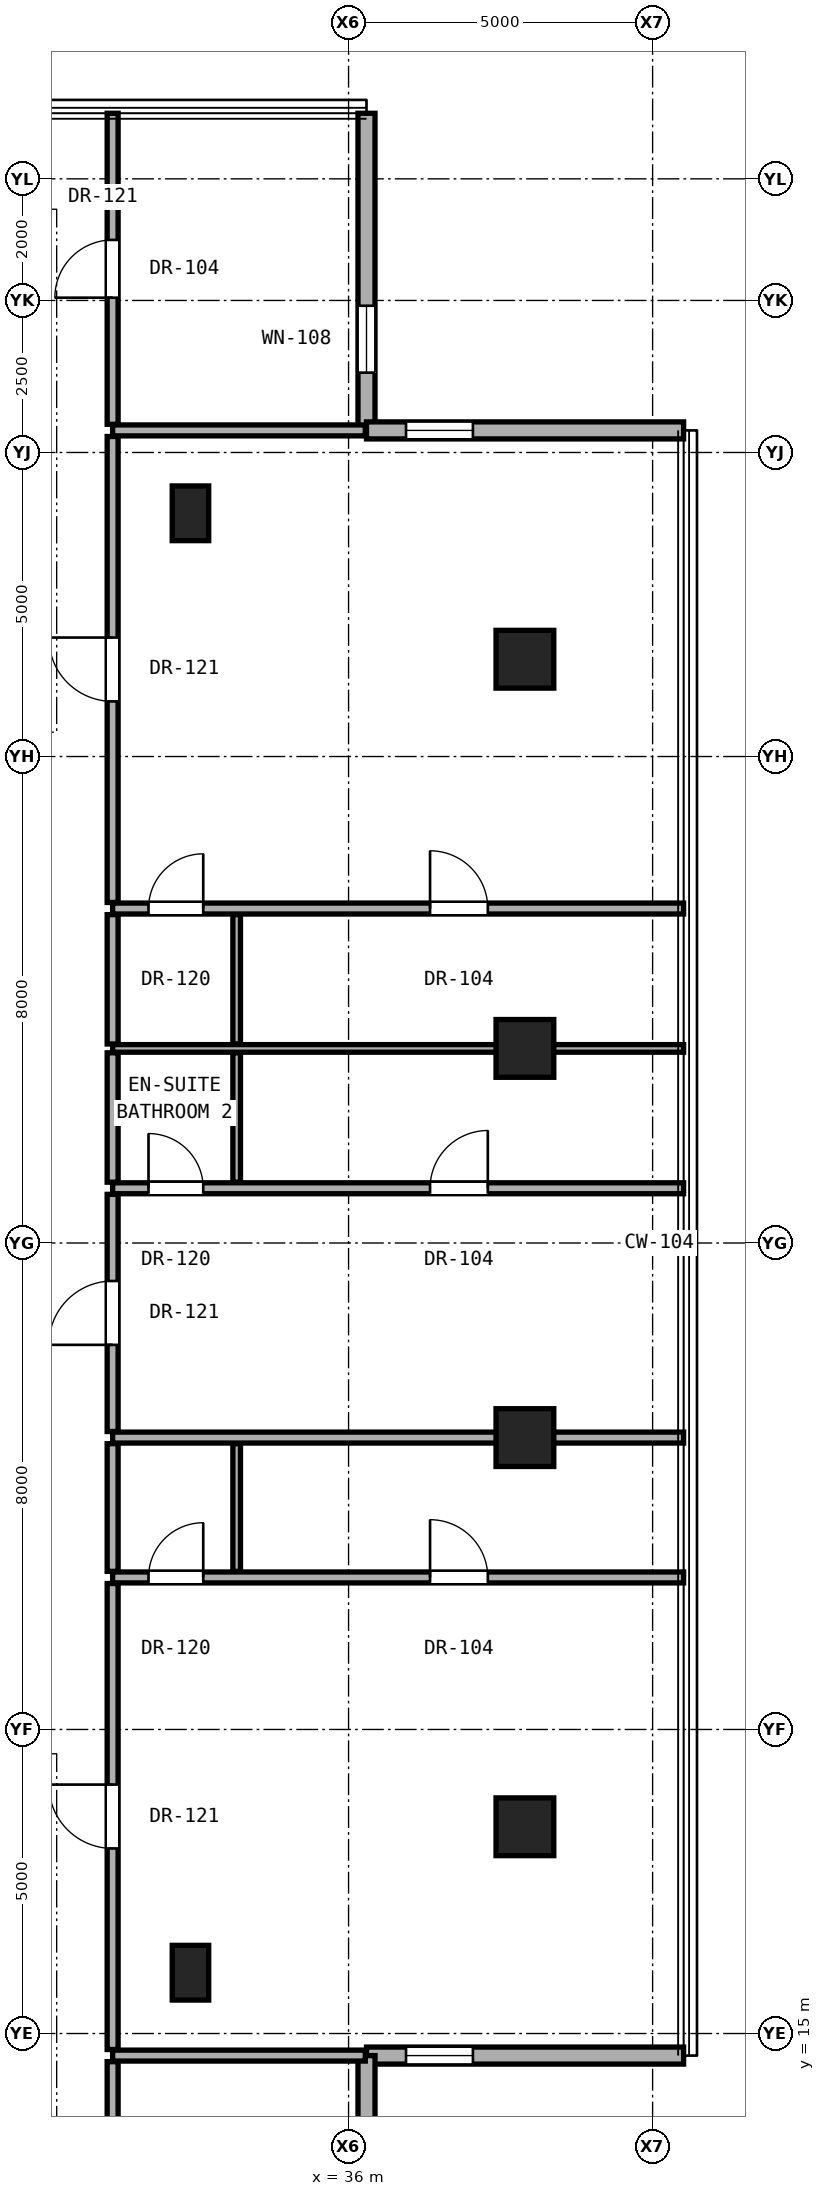
"""IFC4 building model, lengths in metres.
Left out: names, types, materials, properties, quantities, classifications, styles, units other than length and angle.
Written with IfcOpenShell. Run it as: python <this file> out.ifc"""

import sys

from ifc_helpers import new_model, si_unit, direction, frame, frame_2d, origin, origin_2d, place, context, subcontext, project, spatial, rectangle, hollow_rectangle, extrude, element, fill, save


model = new_model("IFC4")
c1 = context("Model", 3, precision=1e-05, world=origin(), true_north=direction((0.0, 1.0)))
c2 = subcontext(c1, "Body", "Model", "MODEL_VIEW")
j1 = project(units=[si_unit("LENGTHUNIT", "METRE"), si_unit("PLANEANGLEUNIT", "RADIAN")], contexts=[c1])
p1 = place(None, origin())
s1 = spatial("IfcSite", under=j1, at=p1, CompositionType="ELEMENT")
p2 = place(p1, origin())
s2 = spatial("IfcBuilding", under=s1, at=p2, CompositionType="ELEMENT")
p3 = place(p2, frame((0.0, 0.0, 203.15)))
s3 = spatial("IfcBuildingStorey", under=s2, at=p3, CompositionType="ELEMENT", Elevation=203.15)
for number, where, z_axis, x_axis in (
    (1, (38.9, 18.4, 0.0), (0.0, 0.0, 1.0), (1.0, 0.0, 0.0)),
    (2, (38.9, 24.8, 0.0), (0.0, 0.0, 1.0), (1.0, 0.0, 0.0)),
    (3, (38.9, 31.2, 0.0), (0.0, 0.0, 1.0), (1.0, 0.0, 0.0)),
    (4, (38.9, 37.6, 0.0), (0.0, 0.0, 1.0), (1.0, 0.0, 0.0)),
):
    element("IfcColumn", number, at=place(p3, frame(where, z_axis=z_axis, x_axis=x_axis)), inside=s3, PredefinedType="COLUMN", context=c2, shape_type="SweptSolid", body=[
        extrude(hollow_rectangle(XDim=0.95, YDim=0.95, WallThickness=0.05, at=origin_2d()), origin(), (0.0, 0.0, 1.0), 3.25),
    ])
for number, where, z_axis, x_axis in (
    (5, (33.4, 16.0, 0.0), (0.0, 0.0, 1.0), (1.0, 0.0, 0.0)),
    (6, (33.4, 40.0, 0.0), (0.0, 0.0, 1.0), (1.0, 0.0, 0.0)),
):
    element("IfcColumn", number, at=place(p3, frame(where, z_axis=z_axis, x_axis=x_axis)), inside=s3, PredefinedType="PILASTER", context=c2, shape_type="SweptSolid", body=[
        extrude(rectangle(XDim=0.6, YDim=0.9, at=origin_2d()), origin(), (0.0, 0.0, 1.0), 3.25),
    ])
p4 = place(p3, frame((36.295, 41.363, 0.0), z_axis=(0.0, 0.0, 1.0), x_axis=(0.0, 1.0, 0.0)))
e7 = element("IfcWall", 7, at=p4, inside=s3, PredefinedType="SOLIDWALL", context=c2, shape_type="SweptSolid", body=[
    extrude(rectangle(XDim=5.215, YDim=0.28, at=frame_2d((2.607, 0.0))), origin(), (0.0, 0.0, 1.0), 3.03),
])
p5 = place(p4, frame((0.95, 0.0, 0.85)))
e8 = element("IfcOpeningElement", 8, at=p5, cuts=e7, PredefinedType="OPENING", context=c2, shape_type="SweptSolid", body=[
    extrude(rectangle(XDim=1.1, YDim=2.0, at=frame_2d((0.55, 1.0))), frame((0.0, 0.15, 0.0), z_axis=(0.0, -1.0, 0.0), x_axis=(1.0, 0.0, 0.0)), (0.0, 0.0, 1.0), 0.3),
])
p6 = place(p3, frame((36.295, 14.637, 0.0), z_axis=(0.0, 0.0, 1.0), x_axis=(1.0, 0.0, 0.0)))
e9 = element("IfcWall", 9, at=p6, inside=s3, PredefinedType="SOLIDWALL", context=c2, shape_type="SweptSolid", body=[
    extrude(rectangle(XDim=5.215, YDim=0.28, at=frame_2d((2.607, 0.0))), origin(), (0.0, 0.0, 1.0), 3.03),
])
p7 = place(p6, frame((0.65, 0.0, 0.85)))
e10 = element("IfcOpeningElement", 10, at=p7, cuts=e9, PredefinedType="OPENING", context=c2, shape_type="SweptSolid", body=[
    extrude(rectangle(XDim=1.1, YDim=2.0, at=frame_2d((0.55, 1.0))), frame((0.0, 0.15, 0.0), z_axis=(0.0, -1.0, 0.0), x_axis=(1.0, 0.0, 0.0)), (0.0, 0.0, 1.0), 0.3),
])
p8 = place(p3, frame((36.295, 9.422, 0.0), z_axis=(0.0, 0.0, 1.0), x_axis=(0.0, 1.0, 0.0)))
e11 = element("IfcWall", 11, at=p8, inside=s3, PredefinedType="SOLIDWALL", context=c2, shape_type="SweptSolid", body=[
    extrude(rectangle(XDim=5.215, YDim=0.28, at=frame_2d((2.607, 0.0))), origin(), (0.0, 0.0, 1.0), 3.03),
])
p9 = place(p3, frame((41.51, 41.363, 0.0), z_axis=(0.0, 0.0, 1.0), x_axis=(-1.0, 0.0, 0.0)))
e12 = element("IfcWall", 12, at=p9, inside=s3, PredefinedType="SOLIDWALL", context=c2, shape_type="SweptSolid", body=[
    extrude(rectangle(XDim=5.215, YDim=0.28, at=frame_2d((2.607, 0.0))), origin(), (0.0, 0.0, 1.0), 3.03),
])
p10 = place(p9, frame((3.465, 0.0, 0.85)))
e13 = element("IfcOpeningElement", 13, at=p10, cuts=e12, PredefinedType="OPENING", context=c2, shape_type="SweptSolid", body=[
    extrude(rectangle(XDim=1.1, YDim=2.0, at=frame_2d((0.55, 1.0))), frame((0.0, 0.15, 0.0), z_axis=(0.0, -1.0, 0.0), x_axis=(1.0, 0.0, 0.0)), (0.0, 0.0, 1.0), 0.3),
])
p11 = place(p3, frame((32.12, 14.637, 0.0), z_axis=(0.0, 0.0, 1.0), x_axis=(1.0, 0.0, 0.0)))
e14 = element("IfcWall", 14, at=p11, inside=s3, PredefinedType="PARTITIONING", context=c2, shape_type="SweptSolid", body=[
    extrude(rectangle(XDim=4.155, YDim=0.18, at=frame_2d((2.077, 0.0))), origin(), (0.0, 0.0, 1.0), 3.05),
])
p12 = place(p3, frame((32.12, 22.5, 0.0), z_axis=(0.0, 0.0, 1.0), x_axis=(1.0, 0.0, 0.0)))
e15 = element("IfcWall", 15, at=p12, inside=s3, PredefinedType="PARTITIONING", context=c2, shape_type="SweptSolid", body=[
    extrude(rectangle(XDim=9.39, YDim=0.18, at=frame_2d((4.695, 0.0))), origin(), (0.0, 0.0, 1.0), 2.269),
])
p13 = place(p12, frame((5.22, 0.0, 0.0)))
e16 = element("IfcOpeningElement", 16, at=p13, cuts=e15, PredefinedType="OPENING", context=c2, shape_type="SweptSolid", body=[
    extrude(rectangle(XDim=0.95, YDim=2.15, at=frame_2d((0.475, 1.075))), frame((0.0, 0.1, 0.0), z_axis=(0.0, -1.0, 0.0), x_axis=(1.0, 0.0, 0.0)), (0.0, 0.0, 1.0), 0.2),
])
p14 = place(p12, frame((0.59, 0.0, 0.0)))
e17 = element("IfcOpeningElement", 17, at=p14, cuts=e15, PredefinedType="OPENING", context=c2, shape_type="SweptSolid", body=[
    extrude(rectangle(XDim=0.9, YDim=2.1, at=frame_2d((0.45, 1.05))), frame((0.0, 0.1, 0.0), z_axis=(0.0, -1.0, 0.0), x_axis=(1.0, 0.0, 0.0)), (0.0, 0.0, 1.0), 0.2),
])
p15 = place(p3, frame((32.12, 24.8, 0.0), z_axis=(0.0, 0.0, 1.0), x_axis=(1.0, 0.0, 0.0)))
e18 = element("IfcWall", 18, at=p15, inside=s3, PredefinedType="PARTITIONING", context=c2, shape_type="SweptSolid", body=[
    extrude(rectangle(XDim=9.39, YDim=0.18, at=frame_2d((4.695, 0.0))), origin(), (0.0, 0.0, 1.0), 2.269),
])
p16 = place(p3, frame((32.12, 28.9, 0.0), z_axis=(0.0, 0.0, 1.0), x_axis=(1.0, 0.0, 0.0)))
e19 = element("IfcWall", 19, at=p16, inside=s3, PredefinedType="PARTITIONING", context=c2, shape_type="SweptSolid", body=[
    extrude(rectangle(XDim=9.39, YDim=0.18, at=frame_2d((4.695, 0.0))), origin(), (0.0, 0.0, 1.0), 2.269),
])
p17 = place(p16, frame((5.22, 0.0, 0.0)))
e20 = element("IfcOpeningElement", 20, at=p17, cuts=e19, PredefinedType="OPENING", context=c2, shape_type="SweptSolid", body=[
    extrude(rectangle(XDim=0.95, YDim=2.15, at=frame_2d((0.475, 1.075))), frame((0.0, 0.1, 0.0), z_axis=(0.0, -1.0, 0.0), x_axis=(1.0, 0.0, 0.0)), (0.0, 0.0, 1.0), 0.2),
])
p18 = place(p16, frame((0.59, 0.0, 0.0)))
e21 = element("IfcOpeningElement", 21, at=p18, cuts=e19, PredefinedType="OPENING", context=c2, shape_type="SweptSolid", body=[
    extrude(rectangle(XDim=0.9, YDim=2.1, at=frame_2d((0.45, 1.05))), frame((0.0, 0.1, 0.0), z_axis=(0.0, -1.0, 0.0), x_axis=(1.0, 0.0, 0.0)), (0.0, 0.0, 1.0), 0.2),
])
p19 = place(p3, frame((32.12, 31.2, 0.0), z_axis=(0.0, 0.0, 1.0), x_axis=(1.0, 0.0, 0.0)))
e22 = element("IfcWall", 22, at=p19, inside=s3, PredefinedType="PARTITIONING", context=c2, shape_type="SweptSolid", body=[
    extrude(rectangle(XDim=9.39, YDim=0.125, at=frame_2d((4.695, 0.0))), origin(), (0.0, 0.0, 1.0), 2.269),
])
p20 = place(p3, frame((32.12, 33.5, 0.0), z_axis=(0.0, 0.0, 1.0), x_axis=(1.0, 0.0, 0.0)))
e23 = element("IfcWall", 23, at=p20, inside=s3, PredefinedType="PARTITIONING", context=c2, shape_type="SweptSolid", body=[
    extrude(rectangle(XDim=9.39, YDim=0.18, at=frame_2d((4.695, 0.0))), origin(), (0.0, 0.0, 1.0), 2.269),
])
p21 = place(p20, frame((5.22, 0.0, 0.0)))
e24 = element("IfcOpeningElement", 24, at=p21, cuts=e23, PredefinedType="OPENING", context=c2, shape_type="SweptSolid", body=[
    extrude(rectangle(XDim=0.95, YDim=2.15, at=frame_2d((0.475, 1.075))), frame((0.0, 0.1, 0.0), z_axis=(0.0, -1.0, 0.0), x_axis=(1.0, 0.0, 0.0)), (0.0, 0.0, 1.0), 0.2),
])
p22 = place(p20, frame((0.59, 0.0, 0.0)))
e25 = element("IfcOpeningElement", 25, at=p22, cuts=e23, PredefinedType="OPENING", context=c2, shape_type="SweptSolid", body=[
    extrude(rectangle(XDim=0.9, YDim=2.1, at=frame_2d((0.45, 1.05))), frame((0.0, 0.1, 0.0), z_axis=(0.0, -1.0, 0.0), x_axis=(1.0, 0.0, 0.0)), (0.0, 0.0, 1.0), 0.2),
])
p23 = place(p3, frame((32.12, 41.363, 0.0), z_axis=(0.0, 0.0, 1.0), x_axis=(1.0, 0.0, 0.0)))
e26 = element("IfcWall", 26, at=p23, inside=s3, PredefinedType="PARTITIONING", context=c2, shape_type="SweptSolid", body=[
    extrude(rectangle(XDim=4.155, YDim=0.18, at=frame_2d((2.077, 0.0))), origin(), (0.0, 0.0, 1.0), 3.05),
])
p24 = place(p3, frame((32.12, 9.422, 0.0), z_axis=(0.0, 0.0, 1.0), x_axis=(0.0, 1.0, 0.0)))
e27 = element("IfcWall", 27, at=p24, inside=s3, PredefinedType="PARTITIONING", context=c2, shape_type="SweptSolid", body=[
    extrude(rectangle(XDim=5.115, YDim=0.18, at=frame_2d((2.558, 0.0))), origin(), (0.0, 0.0, 1.0), 3.05),
])
p25 = place(p24, frame((2.083, 0.0, 0.0)))
e28 = element("IfcOpeningElement", 28, at=p25, cuts=e27, PredefinedType="OPENING", context=c2, shape_type="SweptSolid", body=[
    extrude(rectangle(XDim=0.95, YDim=2.15, at=frame_2d((0.475, 1.075))), frame((0.0, 0.1, 0.0), z_axis=(0.0, -1.0, 0.0), x_axis=(1.0, 0.0, 0.0)), (0.0, 0.0, 1.0), 0.2),
])
p26 = place(p3, frame((32.12, 14.737, 0.0), z_axis=(0.0, 0.0, 1.0), x_axis=(0.0, 1.0, 0.0)))
e29 = element("IfcWall", 29, at=p26, inside=s3, PredefinedType="PARTITIONING", context=c2, shape_type="SweptSolid", body=[
    extrude(rectangle(XDim=7.663, YDim=0.18, at=frame_2d((3.832, 0.0))), origin(), (0.0, 0.0, 1.0), 2.442),
])
p27 = place(p26, frame((3.306, 0.0, 0.0)))
e30 = element("IfcOpeningElement", 30, at=p27, cuts=e29, PredefinedType="OPENING", context=c2, shape_type="SweptSolid", body=[
    extrude(rectangle(XDim=1.05, YDim=2.2, at=frame_2d((0.525, 1.1))), frame((0.0, 0.1, 0.0), z_axis=(0.0, -1.0, 0.0), x_axis=(1.0, 0.0, 0.0)), (0.0, 0.0, 1.0), 0.2),
])
p28 = place(p3, frame((32.12, 22.6, 0.0), z_axis=(0.0, 0.0, 1.0), x_axis=(0.0, 1.0, 0.0)))
e31 = element("IfcWall", 31, at=p28, inside=s3, PredefinedType="PARTITIONING", context=c2, shape_type="SweptSolid", body=[
    extrude(rectangle(XDim=2.1, YDim=0.18, at=frame_2d((1.05, 0.0))), origin(), (0.0, 0.0, 1.0), 2.346),
])
p29 = place(p3, frame((32.12, 24.9, 0.0), z_axis=(0.0, 0.0, 1.0), x_axis=(0.0, 1.0, 0.0)))
e32 = element("IfcWall", 32, at=p29, inside=s3, PredefinedType="PARTITIONING", context=c2, shape_type="SweptSolid", body=[
    extrude(rectangle(XDim=3.9, YDim=0.18, at=frame_2d((1.95, 0.0))), origin(), (0.0, 0.0, 1.0), 2.346),
])
p30 = place(p29, frame((1.425, 0.0, 0.0)))
e33 = element("IfcOpeningElement", 33, at=p30, cuts=e32, PredefinedType="OPENING", context=c2, shape_type="SweptSolid", body=[
    extrude(rectangle(XDim=1.05, YDim=2.2, at=frame_2d((0.525, 1.1))), frame((0.0, 0.1, 0.0), z_axis=(0.0, -1.0, 0.0), x_axis=(1.0, 0.0, 0.0)), (0.0, 0.0, 1.0), 0.2),
])
for number, where, z_axis, x_axis in (
    (34, (32.12, 29.0, 0.0), (0.0, 0.0, 1.0), (0.0, 1.0, 0.0)),
    (35, (32.12, 31.272, 0.0), (0.0, 0.0, 1.0), (0.0, 1.0, 0.0)),
):
    element("IfcWall", number, at=place(p3, frame(where, z_axis=z_axis, x_axis=x_axis)), inside=s3, PredefinedType="PARTITIONING", context=c2, shape_type="SweptSolid", body=[
        extrude(rectangle(XDim=2.127, YDim=0.18, at=frame_2d((1.064, 0.0))), origin(), (0.0, 0.0, 1.0), 2.346),
    ])
p31 = place(p3, frame((32.12, 33.6, 0.0), z_axis=(0.0, 0.0, 1.0), x_axis=(0.0, 1.0, 0.0)))
e36 = element("IfcWall", 36, at=p31, inside=s3, PredefinedType="PARTITIONING", context=c2, shape_type="SweptSolid", body=[
    extrude(rectangle(XDim=7.663, YDim=0.18, at=frame_2d((3.832, 0.0))), origin(), (0.0, 0.0, 1.0), 2.442),
])
p32 = place(p31, frame((3.306, 0.0, 0.0)))
e37 = element("IfcOpeningElement", 37, at=p32, cuts=e36, PredefinedType="OPENING", context=c2, shape_type="SweptSolid", body=[
    extrude(rectangle(XDim=1.05, YDim=2.2, at=frame_2d((0.525, 1.1))), frame((0.0, 0.1, 0.0), z_axis=(0.0, -1.0, 0.0), x_axis=(1.0, 0.0, 0.0)), (0.0, 0.0, 1.0), 0.2),
])
p33 = place(p3, frame((32.12, 41.463, 0.0), z_axis=(0.0, 0.0, 1.0), x_axis=(0.0, 1.0, 0.0)))
e38 = element("IfcWall", 38, at=p33, inside=s3, PredefinedType="PARTITIONING", context=c2, shape_type="SweptSolid", body=[
    extrude(rectangle(XDim=5.115, YDim=0.18, at=frame_2d((2.558, 0.0))), origin(), (0.0, 0.0, 1.0), 3.05),
])
p34 = place(p33, frame((2.083, 0.0, 0.0)))
e39 = element("IfcOpeningElement", 39, at=p34, cuts=e38, PredefinedType="OPENING", context=c2, shape_type="SweptSolid", body=[
    extrude(rectangle(XDim=0.95, YDim=2.15, at=frame_2d((0.475, 1.075))), frame((0.0, 0.1, 0.0), z_axis=(0.0, -1.0, 0.0), x_axis=(1.0, 0.0, 0.0)), (0.0, 0.0, 1.0), 0.2),
])
p35 = place(p3, frame((34.16, 22.6, 0.0), z_axis=(0.0, 0.0, 1.0), x_axis=(0.0, 1.0, 0.0)))
e40 = element("IfcWall", 40, at=p35, inside=s3, PredefinedType="PARTITIONING", context=c2, shape_type="SweptSolid", body=[
    extrude(rectangle(XDim=2.1, YDim=0.125, at=frame_2d((1.05, 0.0))), origin(), (0.0, 0.0, 1.0), 2.346),
])
for number, where, z_axis, x_axis in (
    (41, (34.16, 29.0, 0.0), (0.0, 0.0, 1.0), (0.0, 1.0, 0.0)),
    (42, (34.16, 31.272, 0.0), (0.0, 0.0, 1.0), (0.0, 1.0, 0.0)),
):
    element("IfcWall", number, at=place(p3, frame(where, z_axis=z_axis, x_axis=x_axis)), inside=s3, PredefinedType="PARTITIONING", context=c2, shape_type="SweptSolid", body=[
        extrude(rectangle(XDim=2.127, YDim=0.125, at=frame_2d((1.064, 0.0))), origin(), (0.0, 0.0, 1.0), 2.346),
    ])
p36 = place(p5, origin())
e43 = element("IfcWindow", 43, at=p36, inside=s3, PartitioningType="SINGLE_PANEL", PredefinedType="WINDOW", context=c2, shape_type="SweptSolid", body=[
    extrude(rectangle(XDim=1.1, YDim=2.0, at=frame_2d((0.55, 1.0))), frame((0.0, 0.03, 0.0), z_axis=(0.0, -1.0, 0.0), x_axis=(1.0, 0.0, 0.0)), (0.0, 0.0, 1.0), 0.06),
])
fill(e8, e43)
p37 = place(p7, origin())
e44 = element("IfcWindow", 44, at=p37, inside=s3, PartitioningType="SINGLE_PANEL", PredefinedType="WINDOW", context=c2, shape_type="SweptSolid", body=[
    extrude(rectangle(XDim=1.1, YDim=2.0, at=frame_2d((0.55, 1.0))), frame((0.0, 0.03, 0.0), z_axis=(0.0, -1.0, 0.0), x_axis=(1.0, 0.0, 0.0)), (0.0, 0.0, 1.0), 0.06),
])
fill(e10, e44)
p38 = place(p10, origin())
e45 = element("IfcWindow", 45, at=p38, inside=s3, PartitioningType="SINGLE_PANEL", PredefinedType="WINDOW", context=c2, shape_type="SweptSolid", body=[
    extrude(rectangle(XDim=1.1, YDim=2.0, at=frame_2d((0.55, 1.0))), frame((0.0, 0.03, 0.0), z_axis=(0.0, -1.0, 0.0), x_axis=(1.0, 0.0, 0.0)), (0.0, 0.0, 1.0), 0.06),
])
fill(e13, e45)
p39 = place(p27, origin())
e46 = element("IfcDoor", 46, at=p39, inside=s3, OperationType="SINGLE_SWING_RIGHT", PredefinedType="DOOR", context=c2, shape_type="SweptSolid", body=[
    extrude(rectangle(XDim=1.05, YDim=2.2, at=frame_2d((0.525, 1.1))), frame((0.0, 0.025, 0.0), z_axis=(0.0, -1.0, 0.0), x_axis=(1.0, 0.0, 0.0)), (0.0, 0.0, 1.0), 0.05),
])
fill(e30, e46)
p40 = place(p13, origin())
e47 = element("IfcDoor", 47, at=p40, inside=s3, OperationType="SINGLE_SWING_LEFT", PredefinedType="DOOR", context=c2, shape_type="SweptSolid", body=[
    extrude(rectangle(XDim=0.95, YDim=2.15, at=frame_2d((0.475, 1.075))), frame((0.0, 0.025, 0.0), z_axis=(0.0, -1.0, 0.0), x_axis=(1.0, 0.0, 0.0)), (0.0, 0.0, 1.0), 0.05),
])
fill(e16, e47)
p41 = place(p14, origin())
e48 = element("IfcDoor", 48, at=p41, inside=s3, OperationType="SINGLE_SWING_RIGHT", PredefinedType="DOOR", context=c2, shape_type="SweptSolid", body=[
    extrude(rectangle(XDim=0.9, YDim=2.1, at=frame_2d((0.45, 1.05))), frame((0.0, 0.025, 0.0), z_axis=(0.0, -1.0, 0.0), x_axis=(1.0, 0.0, 0.0)), (0.0, 0.0, 1.0), 0.05),
])
fill(e17, e48)
p42 = place(p30, origin())
e49 = element("IfcDoor", 49, at=p42, inside=s3, OperationType="SINGLE_SWING_LEFT", PredefinedType="DOOR", context=c2, shape_type="SweptSolid", body=[
    extrude(rectangle(XDim=1.05, YDim=2.2, at=frame_2d((0.525, 1.1))), frame((0.0, 0.025, 0.0), z_axis=(0.0, -1.0, 0.0), x_axis=(1.0, 0.0, 0.0)), (0.0, 0.0, 1.0), 0.05),
])
fill(e33, e49)
p43 = place(p17, origin())
e50 = element("IfcDoor", 50, at=p43, inside=s3, OperationType="SINGLE_SWING_RIGHT", PredefinedType="DOOR", context=c2, shape_type="SweptSolid", body=[
    extrude(rectangle(XDim=0.95, YDim=2.15, at=frame_2d((0.475, 1.075))), frame((0.0, 0.025, 0.0), z_axis=(0.0, -1.0, 0.0), x_axis=(1.0, 0.0, 0.0)), (0.0, 0.0, 1.0), 0.05),
])
fill(e20, e50)
p44 = place(p18, origin())
e51 = element("IfcDoor", 51, at=p44, inside=s3, OperationType="SINGLE_SWING_LEFT", PredefinedType="DOOR", context=c2, shape_type="SweptSolid", body=[
    extrude(rectangle(XDim=0.9, YDim=2.1, at=frame_2d((0.45, 1.05))), frame((0.0, 0.025, 0.0), z_axis=(0.0, -1.0, 0.0), x_axis=(1.0, 0.0, 0.0)), (0.0, 0.0, 1.0), 0.05),
])
fill(e21, e51)
p45 = place(p32, origin())
e52 = element("IfcDoor", 52, at=p45, inside=s3, OperationType="SINGLE_SWING_RIGHT", PredefinedType="DOOR", context=c2, shape_type="SweptSolid", body=[
    extrude(rectangle(XDim=1.05, YDim=2.2, at=frame_2d((0.525, 1.1))), frame((0.0, 0.025, 0.0), z_axis=(0.0, -1.0, 0.0), x_axis=(1.0, 0.0, 0.0)), (0.0, 0.0, 1.0), 0.05),
])
fill(e37, e52)
p46 = place(p21, origin())
e53 = element("IfcDoor", 53, at=p46, inside=s3, OperationType="SINGLE_SWING_LEFT", PredefinedType="DOOR", context=c2, shape_type="SweptSolid", body=[
    extrude(rectangle(XDim=0.95, YDim=2.15, at=frame_2d((0.475, 1.075))), frame((0.0, 0.025, 0.0), z_axis=(0.0, -1.0, 0.0), x_axis=(1.0, 0.0, 0.0)), (0.0, 0.0, 1.0), 0.05),
])
fill(e24, e53)
p47 = place(p22, origin())
e54 = element("IfcDoor", 54, at=p47, inside=s3, OperationType="SINGLE_SWING_RIGHT", PredefinedType="DOOR", context=c2, shape_type="SweptSolid", body=[
    extrude(rectangle(XDim=0.9, YDim=2.1, at=frame_2d((0.45, 1.05))), frame((0.0, 0.025, 0.0), z_axis=(0.0, -1.0, 0.0), x_axis=(1.0, 0.0, 0.0)), (0.0, 0.0, 1.0), 0.05),
])
fill(e25, e54)
p48 = place(p34, origin())
e55 = element("IfcDoor", 55, at=p48, inside=s3, OperationType="SINGLE_SWING_LEFT", PredefinedType="DOOR", context=c2, shape_type="SweptSolid", body=[
    extrude(rectangle(XDim=0.95, YDim=2.15, at=frame_2d((0.475, 1.075))), frame((0.0, 0.025, 0.0), z_axis=(0.0, -1.0, 0.0), x_axis=(1.0, 0.0, 0.0)), (0.0, 0.0, 1.0), 0.05),
])
fill(e39, e55)
save(model, sys.argv[1])
